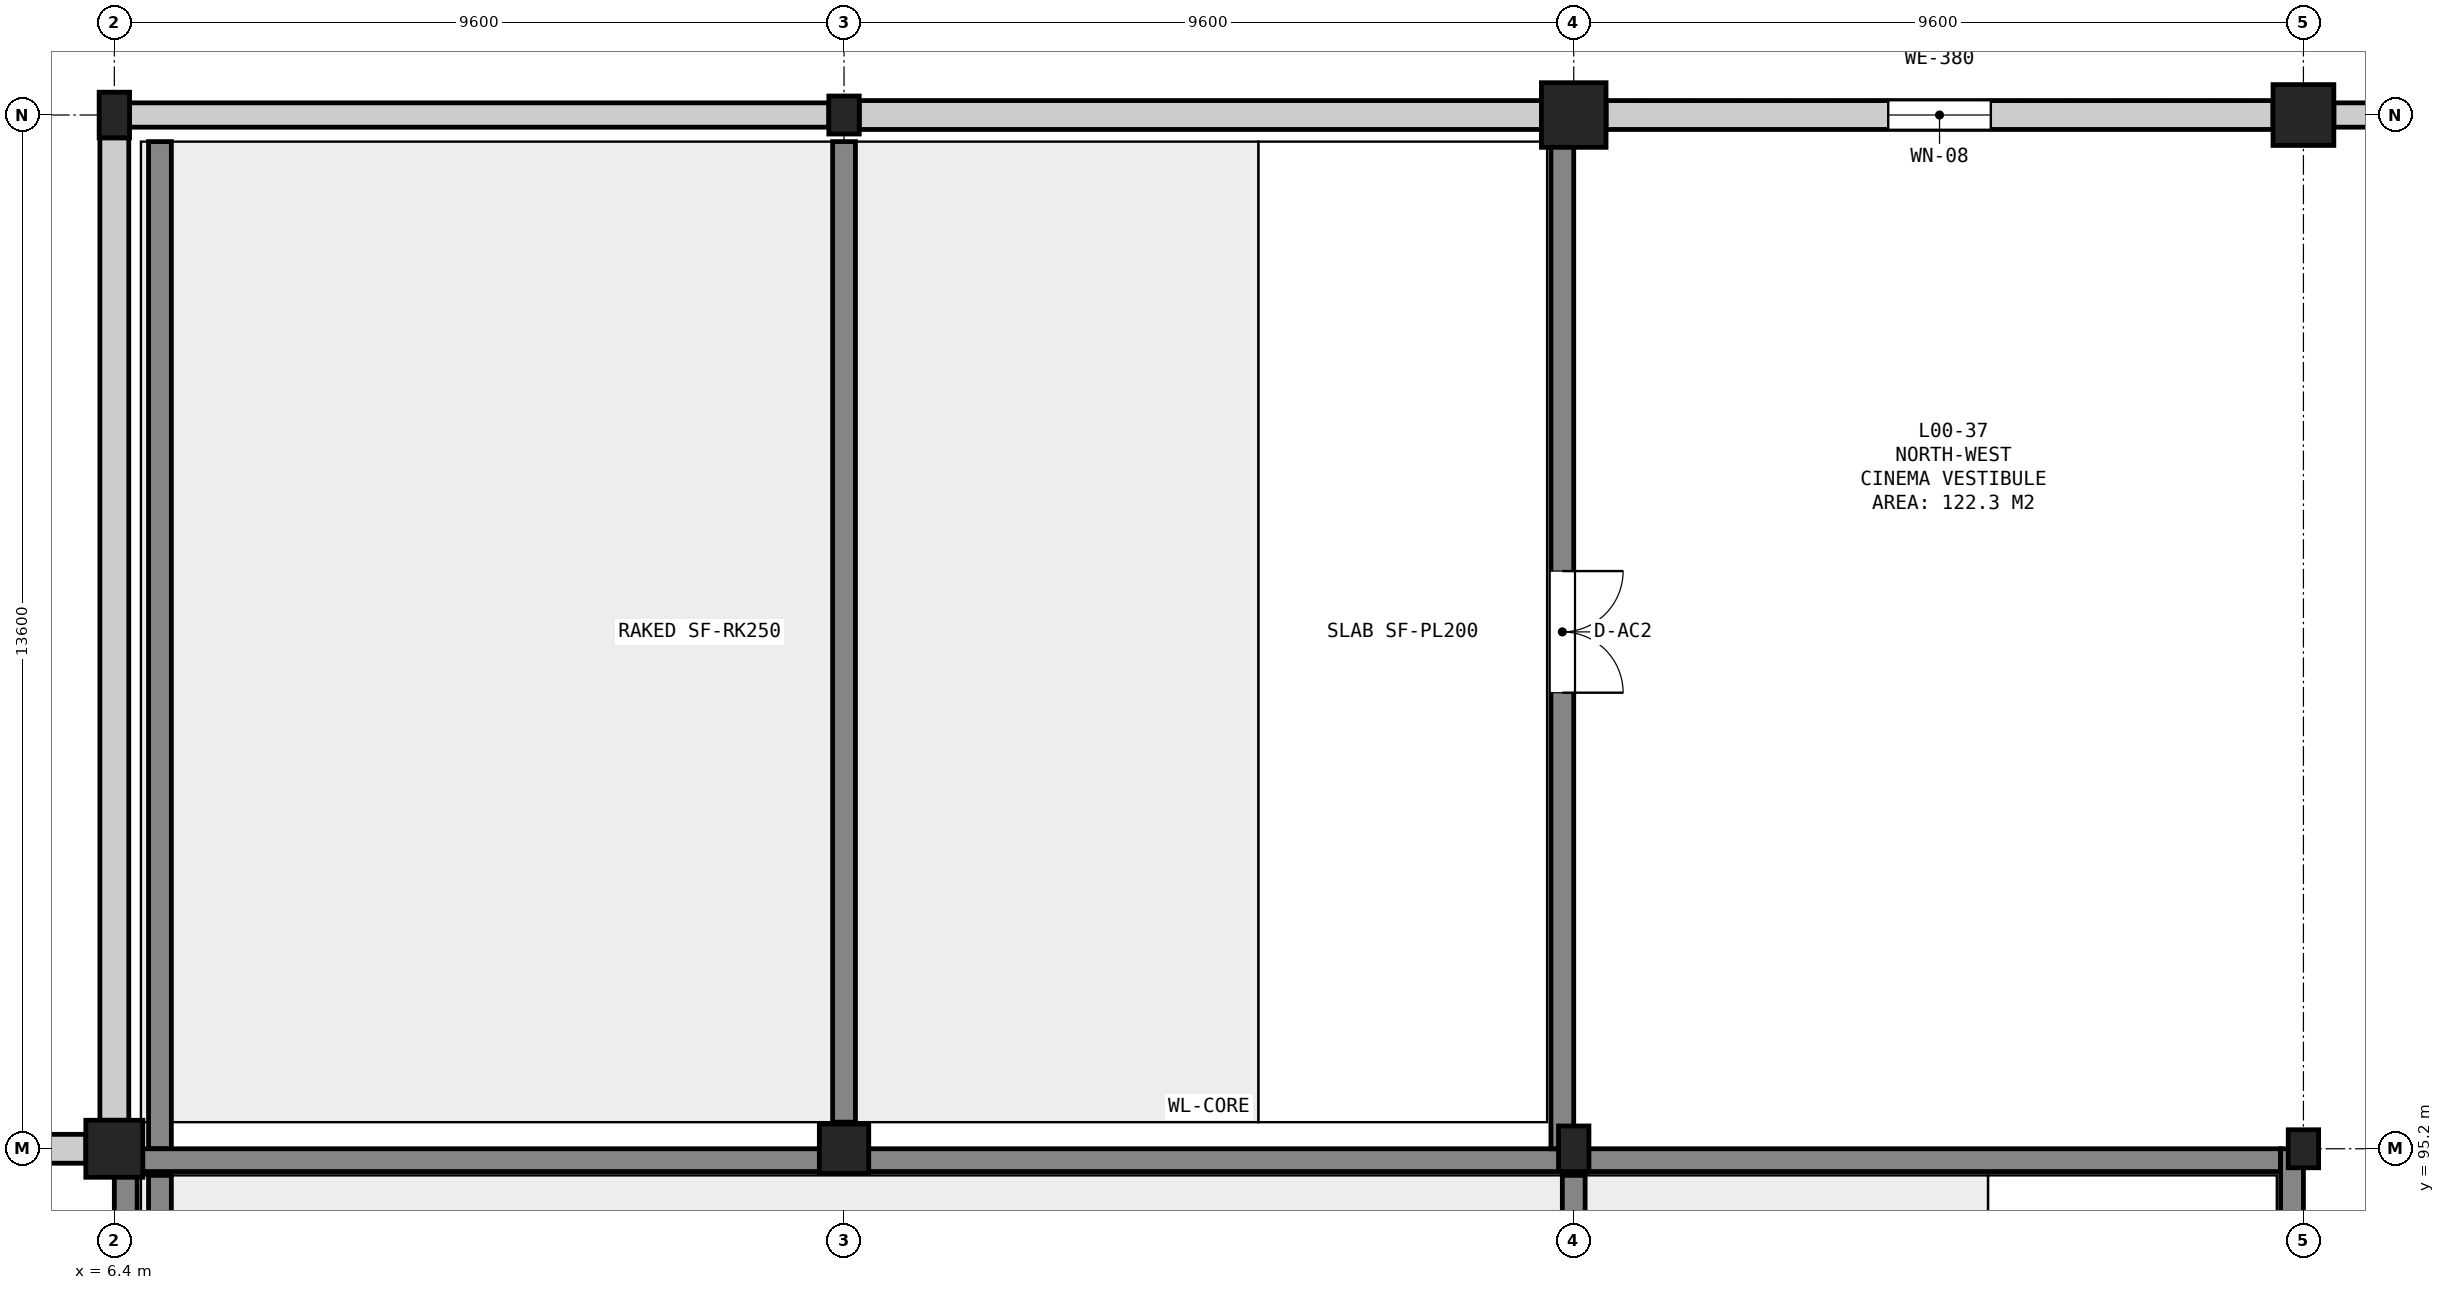
"""IFC4 building model, lengths in metres.
Left out: names, types, materials, properties, quantities, classifications, styles, units other than length and angle.
Written with IfcOpenShell. Run it as: python <this file> out.ifc"""

import sys

from ifc_helpers import new_model, si_unit, direction, frame, frame_2d, origin, origin_2d, place, context, subcontext, project, spatial, rectangle, extrude, element, fill, save


model = new_model("IFC4")
c1 = context("Model", 3, precision=1e-05, world=origin(), true_north=direction((0.0, 1.0)))
c2 = subcontext(c1, "Body", "Model", "MODEL_VIEW")
j1 = project(units=[si_unit("LENGTHUNIT", "METRE"), si_unit("PLANEANGLEUNIT", "RADIAN")], contexts=[c1])
p1 = place(None, origin())
s1 = spatial("IfcSite", under=j1, at=p1, CompositionType="ELEMENT")
p2 = place(p1, origin())
s2 = spatial("IfcBuilding", under=s1, at=p2, CompositionType="ELEMENT")
p3 = place(p2, origin())
s3 = spatial("IfcBuildingStorey", under=s2, at=p3, CompositionType="ELEMENT", Elevation=0.0)
p4 = place(p3, frame((6.4, 95.2, 0.0), z_axis=(0.0, 0.0, 1.0), x_axis=(1.0, 0.0, 0.0)))
e1 = element("IfcColumn", 1, at=p4, inside=s3, PredefinedType="COLUMN", context=c2, shape_type="SweptSolid", body=[
    extrude(rectangle(XDim=0.75, YDim=0.75, at=origin_2d()), origin(), (0.0, 0.0, 1.0), 5.4),
])
p5 = place(p3, frame((6.4, 108.8, 0.0), z_axis=(0.0, 0.0, 1.0), x_axis=(1.0, 0.0, 0.0)))
e2 = element("IfcColumn", 2, at=p5, inside=s3, PredefinedType="COLUMN", context=c2, shape_type="SweptSolid", body=[
    extrude(rectangle(XDim=0.4, YDim=0.6, at=origin_2d()), origin(), (0.0, 0.0, 1.0), 5.4),
])
p6 = place(p3, frame((16.0, 95.2, 0.0), z_axis=(0.0, 0.0, 1.0), x_axis=(1.0, 0.0, 0.0)))
e3 = element("IfcColumn", 3, at=p6, inside=s3, PredefinedType="COLUMN", context=c2, shape_type="SweptSolid", body=[
    extrude(rectangle(XDim=0.65, YDim=0.65, at=origin_2d()), origin(), (0.0, 0.0, 1.0), 5.4),
])
p7 = place(p3, frame((16.0, 108.8, 0.0), z_axis=(0.0, 0.0, 1.0), x_axis=(1.0, 0.0, 0.0)))
e4 = element("IfcColumn", 4, at=p7, inside=s3, PredefinedType="COLUMN", context=c2, shape_type="SweptSolid", body=[
    extrude(rectangle(XDim=0.4, YDim=0.5, at=origin_2d()), origin(), (0.0, 0.0, 1.0), 5.4),
])
p8 = place(p3, frame((25.6, 95.2, 0.0), z_axis=(0.0, 0.0, 1.0), x_axis=(1.0, 0.0, 0.0)))
e5 = element("IfcColumn", 5, at=p8, inside=s3, PredefinedType="COLUMN", context=c2, shape_type="SweptSolid", body=[
    extrude(rectangle(XDim=0.4, YDim=0.6, at=origin_2d()), origin(), (0.0, 0.0, 1.0), 5.4),
])
p9 = place(p3, frame((25.6, 108.8, 0.0), z_axis=(0.0, 0.0, 1.0), x_axis=(1.0, 0.0, 0.0)))
e6 = element("IfcColumn", 6, at=p9, inside=s3, PredefinedType="COLUMN", context=c2, shape_type="SweptSolid", body=[
    extrude(rectangle(XDim=0.85, YDim=0.85, at=origin_2d()), origin(), (0.0, 0.0, 1.0), 5.4),
])
p10 = place(p3, frame((35.2, 95.2, 0.0), z_axis=(0.0, 0.0, 1.0), x_axis=(1.0, 0.0, 0.0)))
e7 = element("IfcColumn", 7, at=p10, inside=s3, PredefinedType="COLUMN", context=c2, shape_type="SweptSolid", body=[
    extrude(rectangle(XDim=0.4, YDim=0.5, at=origin_2d()), origin(), (0.0, 0.0, 1.0), 5.4),
])
p11 = place(p3, frame((35.2, 108.8, 0.0), z_axis=(0.0, 0.0, 1.0), x_axis=(1.0, 0.0, 0.0)))
e8 = element("IfcColumn", 8, at=p11, inside=s3, PredefinedType="COLUMN", context=c2, shape_type="SweptSolid", body=[
    extrude(rectangle(XDim=0.8, YDim=0.8, at=origin_2d()), origin(), (0.0, 0.0, 1.0), 5.4),
])
p12 = place(p3, frame((25.6, 72.35, 0.0), z_axis=(0.0, 0.0, 1.0), x_axis=(0.0, 1.0, 0.0)))
e9 = element("IfcWall", 9, at=p12, inside=s3, PredefinedType="SHEAR", context=c2, shape_type="SweptSolid", body=[
    extrude(rectangle(XDim=22.5, YDim=0.3, at=frame_2d((11.25, 0.0))), origin(), (0.0, 0.0, 1.0), 0.784),
])
p13 = place(p3, frame((7.0, 72.35, 0.0), z_axis=(0.0, 0.0, 1.0), x_axis=(0.0, 1.0, 0.0)))
e10 = element("IfcWall", 10, at=p13, inside=s3, PredefinedType="SHEAR", context=c2, shape_type="SweptSolid", body=[
    extrude(rectangle(XDim=22.5, YDim=0.3, at=frame_2d((11.25, 0.0))), origin(), (0.0, 0.0, 1.0), 3.597),
])
p14 = place(p3, frame((16.0, 95.55, 0.0), z_axis=(0.0, 0.0, 1.0), x_axis=(0.0, 1.0, 0.0)))
e11 = element("IfcWall", 11, at=p14, inside=s3, PredefinedType="SHEAR", context=c2, shape_type="SweptSolid", body=[
    extrude(rectangle(XDim=12.9, YDim=0.3, at=frame_2d((6.45, 0.0))), origin(), (0.0, 0.0, 1.0), 0.784),
])
p15 = place(p3, frame((7.0, 95.2, 0.0), z_axis=(0.0, 0.0, 1.0), x_axis=(0.0, 1.0, 0.0)))
e12 = element("IfcWall", 12, at=p15, inside=s3, PredefinedType="SHEAR", context=c2, shape_type="SweptSolid", body=[
    extrude(rectangle(XDim=13.25, YDim=0.3, at=frame_2d((6.625, 0.0))), origin(), (0.0, 0.0, 1.0), 2.145),
])
p16 = place(p3, frame((41.225, 108.8, 0.0), z_axis=(0.0, 0.0, 1.0), x_axis=(-1.0, 0.0, 0.0)))
e13 = element("IfcWall", 13, at=p16, inside=s3, PredefinedType="SOLIDWALL", context=c2, shape_type="SweptSolid", body=[
    extrude(rectangle(XDim=5.625, YDim=0.32, at=frame_2d((2.812, 0.0))), origin(), (0.0, 0.0, 1.0), 4.48),
])
p17 = place(p16, frame((1.925, 0.0, 0.0)))
e14 = element("IfcOpeningElement", 14, at=p17, cuts=e13, PredefinedType="OPENING", context=c2, shape_type="SweptSolid", body=[
    extrude(rectangle(XDim=1.8, YDim=2.25, at=frame_2d((0.9, 1.125))), frame((0.0, 0.172, 0.0), z_axis=(0.0, -1.0, 0.0), x_axis=(1.0, 0.0, 0.0)), (0.0, 0.0, 1.0), 0.344),
])
p18 = place(p3, frame((34.8, 108.8, 0.0), z_axis=(0.0, 0.0, 1.0), x_axis=(-1.0, 0.0, 0.0)))
e15 = element("IfcWall", 15, at=p18, inside=s3, PredefinedType="SOLIDWALL", context=c2, shape_type="SweptSolid", body=[
    extrude(rectangle(XDim=8.775, YDim=0.38, at=frame_2d((4.388, 0.0))), origin(), (0.0, 0.0, 1.0), 4.48),
])
p19 = place(p18, frame((3.712, 0.0, 0.9)))
e16 = element("IfcOpeningElement", 16, at=p19, cuts=e15, PredefinedType="OPENING", context=c2, shape_type="SweptSolid", body=[
    extrude(rectangle(XDim=1.35, YDim=1.75, at=frame_2d((0.675, 0.875))), frame((0.0, 0.202, 0.0), z_axis=(0.0, -1.0, 0.0), x_axis=(1.0, 0.0, 0.0)), (0.0, 0.0, 1.0), 0.404),
])
p20 = place(p3, frame((25.175, 108.8, 0.0), z_axis=(0.0, 0.0, 1.0), x_axis=(-1.0, 0.0, 0.0)))
e17 = element("IfcWall", 17, at=p20, inside=s3, PredefinedType="SOLIDWALL", context=c2, shape_type="SweptSolid", body=[
    extrude(rectangle(XDim=8.975, YDim=0.38, at=frame_2d((4.488, 0.0))), origin(), (0.0, 0.0, 1.0), 4.495),
])
p21 = place(p3, frame((15.8, 108.8, 0.0), z_axis=(0.0, 0.0, 1.0), x_axis=(-1.0, 0.0, 0.0)))
e18 = element("IfcWall", 18, at=p21, inside=s3, PredefinedType="SOLIDWALL", context=c2, shape_type="SweptSolid", body=[
    extrude(rectangle(XDim=9.2, YDim=0.32, at=frame_2d((4.6, 0.0))), origin(), (0.0, 0.0, 1.0), 4.515),
])
p22 = place(p3, frame((6.4, 108.5, 0.0), z_axis=(0.0, 0.0, 1.0), x_axis=(0.0, -1.0, 0.0)))
e19 = element("IfcWall", 19, at=p22, inside=s3, PredefinedType="SOLIDWALL", context=c2, shape_type="SweptSolid", body=[
    extrude(rectangle(XDim=12.925, YDim=0.38, at=frame_2d((6.462, 0.0))), origin(), (0.0, 0.0, 1.0), 4.475),
])
p23 = place(p3, frame((6.025, 95.2, 0.0), z_axis=(0.0, 0.0, 1.0), x_axis=(-1.0, 0.0, 0.0)))
e20 = element("IfcWall", 20, at=p23, inside=s3, PredefinedType="SOLIDWALL", context=c2, shape_type="SweptSolid", body=[
    extrude(rectangle(XDim=5.625, YDim=0.38, at=frame_2d((2.812, 0.0))), origin(), (0.0, 0.0, 1.0), 4.48),
])
p24 = place(p23, frame((2.337, 0.0, 0.9)))
e21 = element("IfcOpeningElement", 21, at=p24, cuts=e20, PredefinedType="OPENING", context=c2, shape_type="SweptSolid", body=[
    extrude(rectangle(XDim=0.95, YDim=1.45, at=frame_2d((0.475, 0.725))), frame((0.0, 0.202, 0.0), z_axis=(0.0, -1.0, 0.0), x_axis=(1.0, 0.0, 0.0)), (0.0, 0.0, 1.0), 0.404),
])
p25 = place(p3, frame((6.7, 95.05, 0.0), z_axis=(0.0, 0.0, 1.0), x_axis=(1.0, 0.0, 0.0)))
e22 = element("IfcWall", 22, at=p25, inside=s3, PredefinedType="SHEAR", context=c2, shape_type="SweptSolid", body=[
    extrude(rectangle(XDim=28.2, YDim=0.3, at=frame_2d((14.1, 0.0))), origin(), (0.0, 0.0, 1.0), 5.08),
])
p26 = place(p3, frame((6.55, 72.0, 0.0), z_axis=(0.0, 0.0, 1.0), x_axis=(0.0, 1.0, 0.0)))
e23 = element("IfcWall", 23, at=p26, inside=s3, PredefinedType="SHEAR", context=c2, shape_type="SweptSolid", body=[
    extrude(rectangle(XDim=23.2, YDim=0.3, at=frame_2d((11.6, 0.0))), origin(), (0.0, 0.0, 1.0), 5.08),
])
p27 = place(p3, frame((35.05, 72.0, 0.0), z_axis=(0.0, 0.0, 1.0), x_axis=(0.0, 1.0, 0.0)))
e24 = element("IfcWall", 24, at=p27, inside=s3, PredefinedType="SHEAR", context=c2, shape_type="SweptSolid", body=[
    extrude(rectangle(XDim=23.2, YDim=0.3, at=frame_2d((11.6, 0.0))), origin(), (0.0, 0.0, 1.0), 5.08),
])
p28 = place(p27, frame((10.3, 0.0, 0.0)))
e25 = element("IfcOpeningElement", 25, at=p28, cuts=e24, PredefinedType="OPENING", context=c2, shape_type="SweptSolid", body=[
    extrude(rectangle(XDim=1.8, YDim=2.3, at=frame_2d((0.9, 1.15))), frame((0.0, 0.162, 0.0), z_axis=(0.0, -1.0, 0.0), x_axis=(1.0, 0.0, 0.0)), (0.0, 0.0, 1.0), 0.324),
])
p29 = place(p3, frame((25.45, 95.2, 0.0), z_axis=(0.0, 0.0, 1.0), x_axis=(0.0, 1.0, 0.0)))
e26 = element("IfcWall", 26, at=p29, inside=s3, PredefinedType="SHEAR", context=c2, shape_type="SweptSolid", body=[
    extrude(rectangle(XDim=13.6, YDim=0.3, at=frame_2d((6.8, 0.0))), origin(), (0.0, 0.0, 1.0), 5.08),
])
p30 = place(p29, frame((6.0, 0.0, 0.0)))
e27 = element("IfcOpeningElement", 27, at=p30, cuts=e26, PredefinedType="OPENING", context=c2, shape_type="SweptSolid", body=[
    extrude(rectangle(XDim=1.6, YDim=2.25, at=frame_2d((0.8, 1.125))), frame((0.0, 0.162, 0.0), z_axis=(0.0, -1.0, 0.0), x_axis=(1.0, 0.0, 0.0)), (0.0, 0.0, 1.0), 0.324),
])
p31 = place(p19, origin())
e28 = element("IfcWindow", 28, at=p31, inside=s3, PartitioningType="SINGLE_PANEL", PredefinedType="WINDOW", context=c2, shape_type="SweptSolid", body=[
    extrude(rectangle(XDim=1.35, YDim=1.75, at=frame_2d((0.675, 0.875))), frame((0.0, 0.03, 0.0), z_axis=(0.0, -1.0, 0.0), x_axis=(1.0, 0.0, 0.0)), (0.0, 0.0, 1.0), 0.06),
])
fill(e16, e28)
p32 = place(p30, frame((1.6, 0.0, 0.0), z_axis=(0.0, 0.0, 1.0), x_axis=(-1.0, 0.0, 0.0)))
e29 = element("IfcDoor", 29, at=p32, inside=s3, OperationType="DOUBLE_DOOR_SINGLE_SWING", PredefinedType="DOOR", context=c2, shape_type="SweptSolid", body=[
    extrude(rectangle(XDim=1.6, YDim=2.25, at=frame_2d((0.8, 1.125))), frame((0.0, 0.025, 0.0), z_axis=(0.0, -1.0, 0.0), x_axis=(1.0, 0.0, 0.0)), (0.0, 0.0, 1.0), 0.05),
])
fill(e27, e29)
save(model, sys.argv[1])
